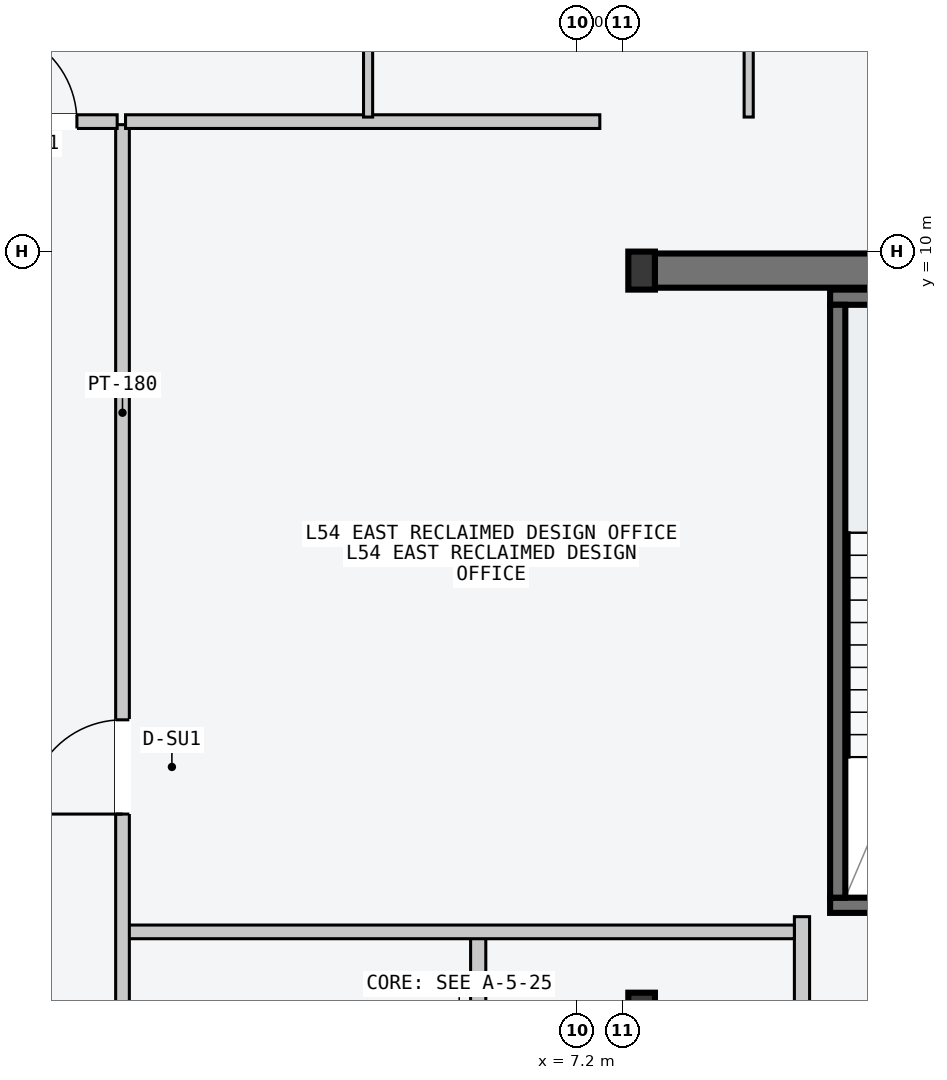
"""IFC4 building model, lengths in metres.
Left out: names, types, materials, properties, quantities, classifications, styles, units other than length and angle.
Written with IfcOpenShell. Run it as: python <this file> out.ifc"""

import sys

from ifc_helpers import new_model, si_unit, direction, frame, frame_2d, origin, origin_2d, place, context, subcontext, project, spatial, rectangle, i_section, extrude, element, fill, save


model = new_model("IFC4")
c1 = context("Model", 3, precision=1e-05, world=origin(), true_north=direction((0.0, 1.0)))
c2 = subcontext(c1, "Body", "Model", "MODEL_VIEW")
j1 = project(units=[si_unit("LENGTHUNIT", "METRE"), si_unit("PLANEANGLEUNIT", "RADIAN")], contexts=[c1])
p1 = place(None, origin())
s1 = spatial("IfcSite", under=j1, at=p1, CompositionType="ELEMENT")
p2 = place(p1, origin())
s2 = spatial("IfcBuilding", under=s1, at=p2, CompositionType="ELEMENT")
p3 = place(p2, frame((0.0, 0.0, 205.5)))
s3 = spatial("IfcBuildingStorey", under=s2, at=p3, CompositionType="ELEMENT", Elevation=205.5)
p4 = place(p3, frame((8.07, 9.75, -0.2), z_axis=(0.0, 0.0, 1.0), x_axis=(1.0, 0.0, 0.0)))
e1 = element("IfcWall", 1, at=p4, inside=s3, PredefinedType="SHEAR", context=c2, shape_type="SweptSolid", body=[
    extrude(rectangle(XDim=6.46, YDim=0.45, at=frame_2d((3.23, 0.0))), origin(), (0.0, 0.0, 1.0), 3.6),
])
p5 = place(p3, frame((10.53, 1.4, -0.2), z_axis=(0.0, 0.0, 1.0), x_axis=(1.0, 0.0, 0.0)))
e2 = element("IfcWall", 2, at=p5, inside=s3, PredefinedType="SOLIDWALL", context=c2, shape_type="SweptSolid", body=[
    extrude(rectangle(XDim=3.72, YDim=0.2, at=frame_2d((1.86, 0.0))), origin(), (0.0, 0.0, 1.0), 3.6),
])
p6 = place(p5, frame((1.5, 0.0, 0.2)))
e3 = element("IfcOpeningElement", 3, at=p6, cuts=e2, PredefinedType="OPENING", context=c2, shape_type="SweptSolid", body=[
    extrude(rectangle(XDim=1.12, YDim=2.18, at=frame_2d((0.56, 1.09))), frame((0.0, 0.11, 0.0), z_axis=(0.0, -1.0, 0.0), x_axis=(1.0, 0.0, 0.0)), (0.0, 0.0, 1.0), 0.22),
])
p7 = place(p3, frame((10.53, 9.4, -0.2), z_axis=(0.0, 0.0, 1.0), x_axis=(1.0, 0.0, 0.0)))
e4 = element("IfcWall", 4, at=p7, inside=s3, PredefinedType="SOLIDWALL", context=c2, shape_type="SweptSolid", body=[
    extrude(rectangle(XDim=3.72, YDim=0.2, at=frame_2d((1.86, 0.0))), origin(), (0.0, 0.0, 1.0), 3.6),
])
p8 = place(p3, frame((10.63, 1.5, -0.2), z_axis=(0.0, 0.0, 1.0), x_axis=(0.0, 1.0, 0.0)))
e5 = element("IfcWall", 5, at=p8, inside=s3, PredefinedType="SOLIDWALL", context=c2, shape_type="SweptSolid", body=[
    extrude(rectangle(XDim=7.8, YDim=0.2, at=frame_2d((3.9, 0.0))), origin(), (0.0, 0.0, 1.0), 3.6),
])
for number, where, z_axis, x_axis in (
    (6, (8.05, 0.0, 0.0), (0.0, 0.0, 1.0), (1.0, 0.0, 0.0)),
    (7, (8.05, 9.75, 0.0), (0.0, 0.0, 1.0), (1.0, 0.0, 0.0)),
):
    element("IfcColumn", number, at=place(p3, frame(where, z_axis=z_axis, x_axis=x_axis)), inside=s3, PredefinedType="COLUMN", context=c2, shape_type="SweptSolid", body=[
        extrude(i_section(OverallWidth=0.35, OverallDepth=0.5, WebThickness=0.02, FlangeThickness=0.032, at=origin_2d()), origin(), (0.0, 0.0, 1.0), 3.6),
    ])
p9 = place(p3, frame((5.9, -9.45, 0.0), z_axis=(0.0, 0.0, 1.0), x_axis=(0.0, 1.0, 0.0)))
e8 = element("IfcWall", 8, at=p9, inside=s3, PredefinedType="PARTITIONING", context=c2, shape_type="SweptSolid", body=[
    extrude(rectangle(XDim=10.5, YDim=0.2, at=frame_2d((5.25, 0.0))), origin(), (0.0, 0.0, 1.0), 3.4),
])
p10 = place(p9, frame((3.9, 0.0, 0.0)))
e9 = element("IfcOpeningElement", 9, at=p10, cuts=e8, PredefinedType="OPENING", context=c2, shape_type="SweptSolid", body=[
    extrude(rectangle(XDim=1.5, YDim=2.2, at=frame_2d((0.75, 1.1))), frame((0.0, 0.11, 0.0), z_axis=(0.0, -1.0, 0.0), x_axis=(1.0, 0.0, 0.0)), (0.0, 0.0, 1.0), 0.22),
])
p11 = place(p3, frame((10.16, -2.55, 0.0), z_axis=(0.0, 0.0, 1.0), x_axis=(0.0, 1.0, 0.0)))
e10 = element("IfcWall", 10, at=p11, inside=s3, PredefinedType="PARTITIONING", context=c2, shape_type="SweptSolid", body=[
    extrude(rectangle(XDim=3.8, YDim=0.2, at=frame_2d((1.9, 0.0))), origin(), (0.0, 0.0, 1.0), 3.4),
])
p12 = place(p11, frame((1.3, 0.0, 0.0)))
e11 = element("IfcOpeningElement", 11, at=p12, cuts=e10, PredefinedType="OPENING", context=c2, shape_type="SweptSolid", body=[
    extrude(rectangle(XDim=1.1, YDim=2.15, at=frame_2d((0.55, 1.075))), frame((0.0, 0.11, 0.0), z_axis=(0.0, -1.0, 0.0), x_axis=(1.0, 0.0, 0.0)), (0.0, 0.0, 1.0), 0.22),
])
p13 = place(p3, frame((1.26, 1.05, 0.0), z_axis=(0.0, 0.0, 1.0), x_axis=(1.0, 0.0, 0.0)))
e12 = element("IfcWall", 12, at=p13, inside=s3, PredefinedType="PARTITIONING", context=c2, shape_type="SweptSolid", body=[
    extrude(rectangle(XDim=8.8, YDim=0.18, at=frame_2d((4.4, 0.0))), origin(), (0.0, 0.0, 1.0), 3.4),
])
p14 = place(p3, frame((1.22, -3.5, 0.0), z_axis=(0.0, 0.0, 1.0), x_axis=(0.0, 1.0, 0.0)))
e13 = element("IfcWall", 13, at=p14, inside=s3, PredefinedType="PARTITIONING", context=c2, shape_type="SweptSolid", body=[
    extrude(rectangle(XDim=15.17, YDim=0.18, at=frame_2d((7.585, 0.0))), origin(), (0.0, 0.0, 1.0), 3.4),
])
p15 = place(p14, frame((6.1, 0.0, 0.0)))
e14 = element("IfcOpeningElement", 14, at=p15, cuts=e13, PredefinedType="OPENING", context=c2, shape_type="SweptSolid", body=[
    extrude(rectangle(XDim=1.24, YDim=2.24, at=frame_2d((0.62, 1.12))), frame((0.0, 0.1, 0.0), z_axis=(0.0, -1.0, 0.0), x_axis=(1.0, 0.0, 0.0)), (0.0, 0.0, 1.0), 0.2),
])
p16 = place(p14, frame((1.6, 0.0, 0.0)))
e15 = element("IfcOpeningElement", 15, at=p16, cuts=e13, PredefinedType="OPENING", context=c2, shape_type="SweptSolid", body=[
    extrude(rectangle(XDim=0.96, YDim=2.18, at=frame_2d((0.48, 1.09))), frame((0.0, 0.1, 0.0), z_axis=(0.0, -1.0, 0.0), x_axis=(1.0, 0.0, 0.0)), (0.0, 0.0, 1.0), 0.2),
])
p17 = place(p3, frame((1.26, 11.71, 0.0), z_axis=(0.0, 0.0, 1.0), x_axis=(1.0, 0.0, 0.0)))
e16 = element("IfcWall", 16, at=p17, inside=s3, PredefinedType="PARTITIONING", context=c2, shape_type="SweptSolid", body=[
    extrude(rectangle(XDim=6.24, YDim=0.18, at=frame_2d((3.12, 0.0))), origin(), (0.0, 0.0, 1.0), 3.4),
])
p18 = place(p3, frame((4.451, 11.77, 0.0), z_axis=(0.0, 0.0, 1.0), x_axis=(0.0, 1.0, 0.0)))
e17 = element("IfcWall", 17, at=p18, inside=s3, PredefinedType="PARTITIONING", context=c2, shape_type="SweptSolid", body=[
    extrude(rectangle(XDim=6.79, YDim=0.12, at=frame_2d((3.395, 0.0))), origin(), (0.0, 0.0, 1.0), 3.4),
])
p19 = place(p18, frame((1.15, 0.0, 0.0)))
e18 = element("IfcOpeningElement", 18, at=p19, cuts=e17, PredefinedType="OPENING", context=c2, shape_type="SweptSolid", body=[
    extrude(rectangle(XDim=0.96, YDim=2.18, at=frame_2d((0.48, 1.09))), frame((0.0, 0.07, 0.0), z_axis=(0.0, -1.0, 0.0), x_axis=(1.0, 0.0, 0.0)), (0.0, 0.0, 1.0), 0.14),
])
p20 = place(p3, frame((9.459, 11.77, 0.0), z_axis=(0.0, 0.0, 1.0), x_axis=(0.0, 1.0, 0.0)))
e19 = element("IfcWall", 19, at=p20, inside=s3, PredefinedType="PARTITIONING", context=c2, shape_type="SweptSolid", body=[
    extrude(rectangle(XDim=6.79, YDim=0.12, at=frame_2d((3.395, 0.0))), origin(), (0.0, 0.0, 1.0), 3.4),
])
p21 = place(p20, frame((1.15, 0.0, 0.0)))
e20 = element("IfcOpeningElement", 20, at=p21, cuts=e19, PredefinedType="OPENING", context=c2, shape_type="SweptSolid", body=[
    extrude(rectangle(XDim=0.96, YDim=2.18, at=frame_2d((0.48, 1.09))), frame((0.0, 0.07, 0.0), z_axis=(0.0, -1.0, 0.0), x_axis=(1.0, 0.0, 0.0)), (0.0, 0.0, 1.0), 0.14),
])
p22 = place(p3, frame((-1.15, 11.71, 0.0), z_axis=(0.0, 0.0, 1.0), x_axis=(1.0, 0.0, 0.0)))
e21 = element("IfcWall", 21, at=p22, inside=s3, PredefinedType="PARTITIONING", context=c2, shape_type="SweptSolid", body=[
    extrude(rectangle(XDim=2.3, YDim=0.18, at=frame_2d((1.15, 0.0))), origin(), (0.0, 0.0, 1.0), 3.4),
])
p23 = place(p22, frame((0.53, 0.0, 0.0)))
e22 = element("IfcOpeningElement", 22, at=p23, cuts=e21, PredefinedType="OPENING", context=c2, shape_type="SweptSolid", body=[
    extrude(rectangle(XDim=1.24, YDim=2.24, at=frame_2d((0.62, 1.12))), frame((0.0, 0.1, 0.0), z_axis=(0.0, -1.0, 0.0), x_axis=(1.0, 0.0, 0.0)), (0.0, 0.0, 1.0), 0.2),
])
p24 = place(p15, origin())
e23 = element("IfcDoor", 23, at=p24, inside=s3, OperationType="SINGLE_SWING_LEFT", PredefinedType="DOOR", context=c2, shape_type="SweptSolid", body=[
    extrude(rectangle(XDim=1.24, YDim=2.24, at=frame_2d((0.62, 1.12))), frame((0.0, 0.025, 0.0), z_axis=(0.0, -1.0, 0.0), x_axis=(1.0, 0.0, 0.0)), (0.0, 0.0, 1.0), 0.05),
])
fill(e14, e23)
p25 = place(p23, origin())
e24 = element("IfcDoor", 24, at=p25, inside=s3, OperationType="SINGLE_SWING_LEFT", PredefinedType="DOOR", context=c2, shape_type="SweptSolid", body=[
    extrude(rectangle(XDim=1.24, YDim=2.24, at=frame_2d((0.62, 1.12))), frame((0.0, 0.025, 0.0), z_axis=(0.0, -1.0, 0.0), x_axis=(1.0, 0.0, 0.0)), (0.0, 0.0, 1.0), 0.05),
])
fill(e22, e24)
save(model, sys.argv[1])
